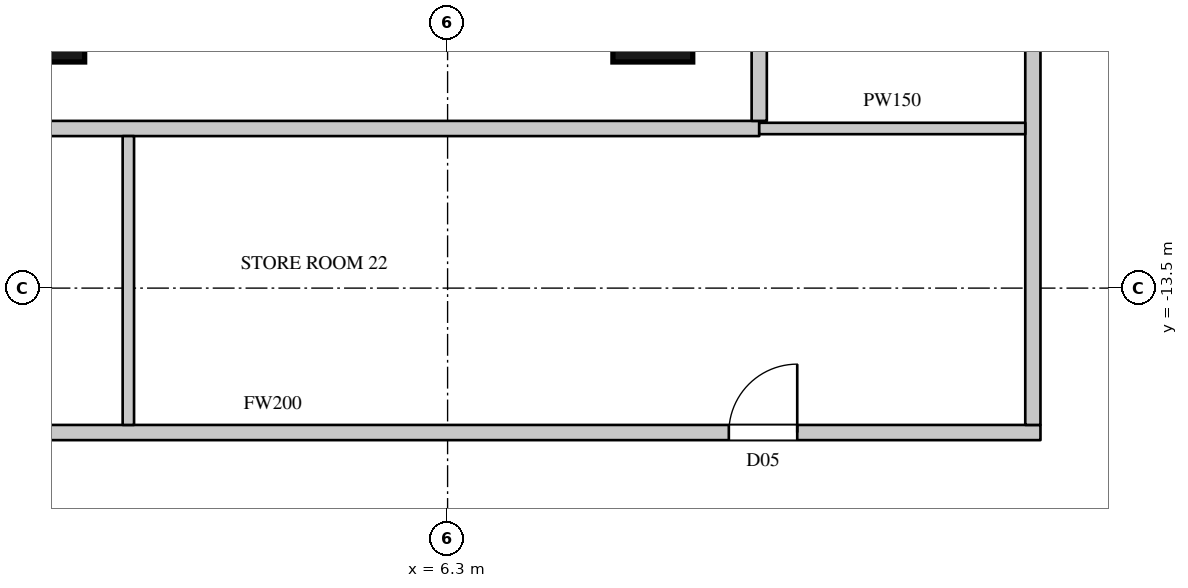
"""IFC4 building model, lengths in metres.
Left out: names, types, materials, properties, quantities, classifications, styles, units other than length and angle.
Written with IfcOpenShell. Run it as: python <this file> out.ifc"""

import sys

from ifc_helpers import new_model, si_unit, direction, frame, frame_2d, origin, origin_2d, place, context, subcontext, project, spatial, rectangle, circle, extrude, element, fill, save


model = new_model("IFC4")
c1 = context("Model", 3, precision=1e-05, world=origin(), true_north=direction((0.0, 1.0)))
c2 = subcontext(c1, "Body", "Model", "MODEL_VIEW")
j1 = project(units=[si_unit("LENGTHUNIT", "METRE"), si_unit("PLANEANGLEUNIT", "RADIAN")], contexts=[c1])
p1 = place(None, origin())
s1 = spatial("IfcSite", under=j1, at=p1, CompositionType="ELEMENT")
p2 = place(p1, origin())
s2 = spatial("IfcBuilding", under=s1, at=p2, CompositionType="ELEMENT")
p3 = place(p2, frame((0.0, 0.0, 109.5)))
s3 = spatial("IfcBuildingStorey", under=s2, at=p3, CompositionType="ELEMENT", Elevation=109.5)
for number, where, z_axis, x_axis in (
    (1, (1.0, -10.0, 0.0), (0.0, 0.0, 1.0), (1.0, 0.0, 0.0)),
    (2, (9.0, -10.0, 0.0), (0.0, 0.0, 1.0), (1.0, 0.0, 0.0)),
):
    element("IfcColumn", number, at=place(p3, frame(where, z_axis=z_axis, x_axis=x_axis)), inside=s3, PredefinedType="COLUMN", context=c2, shape_type="SweptSolid", body=[
        extrude(circle(Radius=0.525, at=origin_2d()), origin(), (0.0, 0.0, 1.0), 3.6),
    ])
p4 = place(p3, frame((-8.5, -11.4, 0.0), z_axis=(0.0, 0.0, 1.0), x_axis=(1.0, 0.0, 0.0)))
e3 = element("IfcWall", 3, at=p4, inside=s3, PredefinedType="PARTITIONING", context=c2, shape_type="SweptSolid", body=[
    extrude(rectangle(XDim=18.9, YDim=0.2, at=frame_2d((9.45, 0.0))), origin(), (0.0, 0.0, 1.0), 3.3),
])
p5 = place(p3, frame((-6.1, -15.4, 0.0), z_axis=(0.0, 0.0, 1.0), x_axis=(1.0, 0.0, 0.0)))
e4 = element("IfcWall", 4, at=p5, inside=s3, PredefinedType="PARTITIONING", context=c2, shape_type="SweptSolid", body=[
    extrude(rectangle(XDim=20.2, YDim=0.2, at=frame_2d((10.1, 0.0))), origin(), (0.0, 0.0, 1.0), 3.3),
])
p6 = place(p5, frame((5.95, 0.0, 0.0)))
e5 = element("IfcOpeningElement", 5, at=p6, cuts=e4, PredefinedType="OPENING", context=c2, shape_type="SweptSolid", body=[
    extrude(rectangle(XDim=0.9, YDim=2.2, at=frame_2d((0.45, 1.1))), frame((0.0, 0.11, 0.0), z_axis=(0.0, -1.0, 0.0), x_axis=(1.0, 0.0, 0.0)), (0.0, 0.0, 1.0), 0.22),
])
p7 = place(p5, frame((16.1, 0.0, 0.0)))
e6 = element("IfcOpeningElement", 6, at=p7, cuts=e4, PredefinedType="OPENING", context=c2, shape_type="SweptSolid", body=[
    extrude(rectangle(XDim=0.9, YDim=2.2, at=frame_2d((0.45, 1.1))), frame((0.0, 0.11, 0.0), z_axis=(0.0, -1.0, 0.0), x_axis=(1.0, 0.0, 0.0)), (0.0, 0.0, 1.0), 0.22),
])
p8 = place(p3, frame((10.4, -11.3, 0.0), z_axis=(0.0, 0.0, 1.0), x_axis=(0.0, 1.0, 0.0)))
e7 = element("IfcWall", 7, at=p8, inside=s3, PredefinedType="PARTITIONING", context=c2, shape_type="SweptSolid", body=[
    extrude(rectangle(XDim=22.6, YDim=0.2, at=frame_2d((11.3, 0.0))), origin(), (0.0, 0.0, 1.0), 3.3),
])
p9 = place(p8, frame((16.3, 0.0, 0.0)))
e8 = element("IfcOpeningElement", 8, at=p9, cuts=e7, PredefinedType="OPENING", context=c2, shape_type="SweptSolid", body=[
    extrude(rectangle(XDim=1.5, YDim=2.2, at=frame_2d((0.75, 1.1))), frame((0.0, 0.11, 0.0), z_axis=(0.0, -1.0, 0.0), x_axis=(1.0, 0.0, 0.0)), (0.0, 0.0, 1.0), 0.22),
])
p10 = place(p8, frame((14.65, 0.0, 0.0)))
e9 = element("IfcOpeningElement", 9, at=p10, cuts=e7, PredefinedType="OPENING", context=c2, shape_type="SweptSolid", body=[
    extrude(rectangle(XDim=1.5, YDim=2.2, at=frame_2d((0.75, 1.1))), frame((0.0, 0.11, 0.0), z_axis=(0.0, -1.0, 0.0), x_axis=(1.0, 0.0, 0.0)), (0.0, 0.0, 1.0), 0.22),
])
p11 = place(p8, frame((11.95, 0.0, 0.0)))
e10 = element("IfcOpeningElement", 10, at=p11, cuts=e7, PredefinedType="OPENING", context=c2, shape_type="SweptSolid", body=[
    extrude(rectangle(XDim=1.5, YDim=2.2, at=frame_2d((0.75, 1.1))), frame((0.0, 0.11, 0.0), z_axis=(0.0, -1.0, 0.0), x_axis=(1.0, 0.0, 0.0)), (0.0, 0.0, 1.0), 0.22),
])
p12 = place(p3, frame((14.0, -15.3, 0.0), z_axis=(0.0, 0.0, 1.0), x_axis=(0.0, 1.0, 0.0)))
e11 = element("IfcWall", 11, at=p12, inside=s3, PredefinedType="PARTITIONING", context=c2, shape_type="SweptSolid", body=[
    extrude(rectangle(XDim=8.475, YDim=0.2, at=frame_2d((4.238, 0.0))), origin(), (0.0, 0.0, 1.0), 3.3),
])
p13 = place(p3, frame((2.1, -15.3, 0.0), z_axis=(0.0, 0.0, 1.0), x_axis=(0.0, 1.0, 0.0)))
e12 = element("IfcWall", 12, at=p13, inside=s3, PredefinedType="PARTITIONING", context=c2, shape_type="SweptSolid", body=[
    extrude(rectangle(XDim=3.8, YDim=0.15, at=frame_2d((1.9, 0.0))), origin(), (0.0, 0.0, 1.0), 3.3),
])
p14 = place(p3, frame((10.4, -11.4, 0.0), z_axis=(0.0, 0.0, 1.0), x_axis=(1.0, 0.0, 0.0)))
e13 = element("IfcWall", 13, at=p14, inside=s3, PredefinedType="PARTITIONING", context=c2, shape_type="SweptSolid", body=[
    extrude(rectangle(XDim=3.5, YDim=0.15, at=frame_2d((1.75, 0.0))), origin(), (0.0, 0.0, 1.0), 3.3),
])
p15 = place(p7, origin())
e14 = element("IfcDoor", 14, at=p15, inside=s3, OperationType="SINGLE_SWING_RIGHT", PredefinedType="DOOR", context=c2, shape_type="SweptSolid", body=[
    extrude(rectangle(XDim=0.9, YDim=2.2, at=frame_2d((0.45, 1.1))), frame((0.0, 0.025, 0.0), z_axis=(0.0, -1.0, 0.0), x_axis=(1.0, 0.0, 0.0)), (0.0, 0.0, 1.0), 0.05),
])
fill(e6, e14)
save(model, sys.argv[1])
